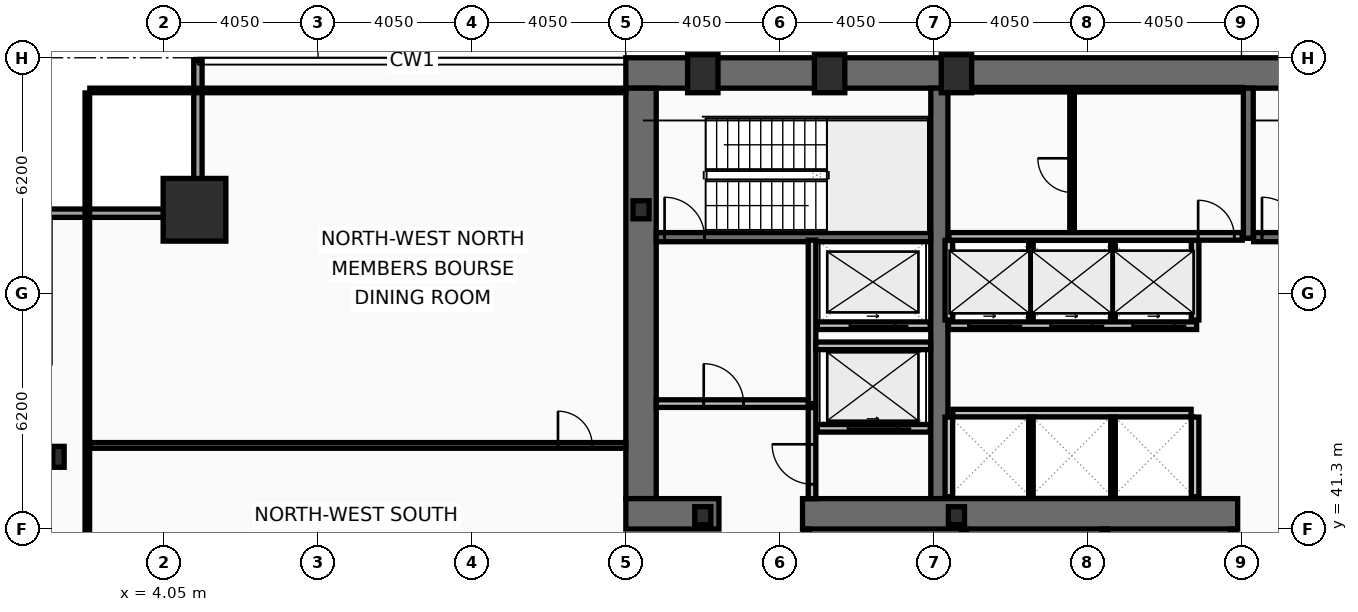
"""IFC4 building model, lengths in metres.
Left out: names, types, materials, properties, quantities, classifications, styles, units other than length and angle.
Written with IfcOpenShell. Run it as: python <this file> out.ifc"""

import sys

from ifc_helpers import new_model, si_unit, direction, frame, frame_2d, origin, origin_2d, place, context, subcontext, project, spatial, rectangle, hollow_rectangle, i_section, extrude, element, fill, save


model = new_model("IFC4")
c1 = context("Model", 3, precision=1e-05, world=origin(), true_north=direction((0.0, 1.0)))
c2 = subcontext(c1, "Body", "Model", "MODEL_VIEW")
j1 = project(units=[si_unit("LENGTHUNIT", "METRE"), si_unit("PLANEANGLEUNIT", "RADIAN")], contexts=[c1])
p1 = place(None, origin())
s1 = spatial("IfcSite", under=j1, at=p1, CompositionType="ELEMENT")
p2 = place(p1, origin())
s2 = spatial("IfcBuilding", under=s1, at=p2, CompositionType="ELEMENT")
p3 = place(p2, frame((0.0, 0.0, 49.8)))
s3 = spatial("IfcBuildingStorey", under=s2, at=p3, CompositionType="ELEMENT", Elevation=49.8)
p4 = place(p3, frame((16.2, 53.3, 0.0), z_axis=(0.0, 0.0, 1.0), x_axis=(1.0, 0.0, 0.0)))
e1 = element("IfcWall", 1, at=p4, inside=s3, PredefinedType="SHEAR", context=c2, shape_type="SweptSolid", body=[
    extrude(rectangle(XDim=40.5, YDim=0.8, at=frame_2d((20.25, 0.0))), origin(), (0.0, 0.0, 1.0), 3.82),
])
p5 = place(p3, frame((16.6, 42.1, 0.0), z_axis=(0.0, 0.0, 1.0), x_axis=(0.0, 1.0, 0.0)))
e2 = element("IfcWall", 2, at=p5, inside=s3, PredefinedType="SHEAR", context=c2, shape_type="SweptSolid", body=[
    extrude(rectangle(XDim=10.8, YDim=0.8, at=frame_2d((5.4, 0.0))), origin(), (0.0, 0.0, 1.0), 3.82),
])
p6 = place(p3, frame((24.45, 42.1, 0.0), z_axis=(0.0, 0.0, 1.0), x_axis=(0.0, 1.0, 0.0)))
e3 = element("IfcWall", 3, at=p6, inside=s3, PredefinedType="SHEAR", context=c2, shape_type="SweptSolid", body=[
    extrude(rectangle(XDim=10.8, YDim=0.45, at=frame_2d((5.4, 0.0))), origin(), (0.0, 0.0, 1.0), 3.82),
])
p7 = place(p3, frame((18.65, 41.7, 0.0), z_axis=(0.0, 0.0, 1.0), x_axis=(-1.0, 0.0, 0.0)))
e4 = element("IfcWall", 4, at=p7, inside=s3, PredefinedType="SHEAR", context=c2, shape_type="SweptSolid", body=[
    extrude(rectangle(XDim=2.45, YDim=0.8, at=frame_2d((1.225, 0.0))), origin(), (0.0, 0.0, 1.0), 3.82),
])
p8 = place(p3, frame((32.3, 41.7, 0.0), z_axis=(0.0, 0.0, 1.0), x_axis=(-1.0, 0.0, 0.0)))
e5 = element("IfcWall", 5, at=p8, inside=s3, PredefinedType="SHEAR", context=c2, shape_type="SweptSolid", body=[
    extrude(rectangle(XDim=11.45, YDim=0.8, at=frame_2d((5.725, 0.0))), origin(), (0.0, 0.0, 1.0), 3.82),
])
p9 = place(p3, frame((32.58, 48.95, 0.0), z_axis=(0.0, 0.0, 1.0), x_axis=(0.0, 1.0, 0.0)))
e6 = element("IfcWall", 6, at=p9, inside=s3, PredefinedType="SHEAR", context=c2, shape_type="SweptSolid", body=[
    extrude(rectangle(XDim=3.95, YDim=0.26, at=frame_2d((1.975, 0.0))), origin(), (0.0, 0.0, 1.0), 3.82),
])
p10 = place(p3, frame((17.0, 48.98, 0.0), z_axis=(0.0, 0.0, 1.0), x_axis=(1.0, 0.0, 0.0)))
e7 = element("IfcWall", 7, at=p10, inside=s3, PredefinedType="SHEAR", context=c2, shape_type="SweptSolid", body=[
    extrude(rectangle(XDim=7.22, YDim=0.24, at=frame_2d((3.61, 0.0))), origin(), (0.0, 0.0, 1.0), 3.82),
])
p11 = place(p10, frame((0.22, 0.0, 0.0)))
e8 = element("IfcOpeningElement", 8, at=p11, cuts=e7, PredefinedType="OPENING", context=c2, shape_type="SweptSolid", body=[
    extrude(rectangle(XDim=1.05, YDim=2.15, at=frame_2d((0.525, 1.075))), frame((0.0, 0.13, 0.0), z_axis=(0.0, -1.0, 0.0), x_axis=(1.0, 0.0, 0.0)), (0.0, 0.0, 1.0), 0.26),
])
p12 = place(p3, frame((32.72, 48.98, 0.0), z_axis=(0.0, 0.0, 1.0), x_axis=(1.0, 0.0, 0.0)))
e9 = element("IfcWall", 9, at=p12, inside=s3, PredefinedType="SHEAR", context=c2, shape_type="SweptSolid", body=[
    extrude(rectangle(XDim=7.56, YDim=0.24, at=frame_2d((3.78, 0.0))), origin(), (0.0, 0.0, 1.0), 3.82),
])
p13 = place(p12, frame((0.22, 0.0, 0.0)))
e10 = element("IfcOpeningElement", 10, at=p13, cuts=e9, PredefinedType="OPENING", context=c2, shape_type="SweptSolid", body=[
    extrude(rectangle(XDim=1.05, YDim=2.15, at=frame_2d((0.525, 1.075))), frame((0.0, 0.13, 0.0), z_axis=(0.0, -1.0, 0.0), x_axis=(1.0, 0.0, 0.0)), (0.0, 0.0, 1.0), 0.26),
])
p14 = place(p3, frame((4.85, 49.7, 0.0), z_axis=(0.0, 0.0, 1.0), x_axis=(1.0, 0.0, 0.0)))
e11 = element("IfcColumn", 11, at=p14, inside=s3, PredefinedType="COLUMN", context=c2, shape_type="SweptSolid", body=[
    extrude(hollow_rectangle(XDim=1.65, YDim=1.65, WallThickness=0.075, at=origin_2d()), origin(), (0.0, 0.0, 1.0), 4.0),
])
for number, where, z_axis, x_axis in (
    (12, (18.225, 53.28, 0.0), (0.0, 0.0, 1.0), (1.0, 0.0, 0.0)),
    (13, (21.562, 53.28, 0.0), (0.0, 0.0, 1.0), (1.0, 0.0, 0.0)),
    (14, (24.9, 53.28, 0.0), (0.0, 0.0, 1.0), (1.0, 0.0, 0.0)),
):
    element("IfcColumn", number, at=place(p3, frame(where, z_axis=z_axis, x_axis=x_axis)), inside=s3, PredefinedType="COLUMN", context=c2, shape_type="SweptSolid", body=[
        extrude(hollow_rectangle(XDim=0.8, YDim=1.0, WallThickness=0.055, at=origin_2d()), origin(), (0.0, 0.0, 1.0), 4.0),
    ])
p15 = place(p3, frame((1.27, 43.2, 0.0), z_axis=(0.0, 0.0, 1.0), x_axis=(1.0, 0.0, 0.0)))
e15 = element("IfcColumn", 15, at=p15, inside=s3, PredefinedType="COLUMN", context=c2, shape_type="SweptSolid", body=[
    extrude(i_section(OverallWidth=0.3, OverallDepth=0.55, WebThickness=0.015, FlangeThickness=0.029, at=origin_2d()), origin(), (0.0, 0.0, 1.0), 4.0),
])
for number, where, z_axis, x_axis in (
    (16, (16.6, 49.7, 0.0), (0.0, 0.0, 1.0), (1.0, 0.0, 0.0)),
    (17, (18.225, 41.65, 0.0), (0.0, 0.0, 1.0), (1.0, 0.0, 0.0)),
    (18, (24.9, 41.65, 0.0), (0.0, 0.0, 1.0), (1.0, 0.0, 0.0)),
):
    element("IfcColumn", number, at=place(p3, frame(where, z_axis=z_axis, x_axis=x_axis)), inside=s3, PredefinedType="COLUMN", context=c2, shape_type="SweptSolid", body=[
        extrude(i_section(OverallWidth=0.424, OverallDepth=0.474, WebThickness=0.048, FlangeThickness=0.077, at=origin_2d()), origin(), (0.0, 0.0, 1.0), 4.0),
    ])
p16 = place(p3, frame((0.83, 49.61, 0.0), z_axis=(0.0, 0.0, 1.0), x_axis=(1.0, 0.0, 0.0)))
e19 = element("IfcWall", 19, at=p16, inside=s3, PredefinedType="SOLIDWALL", context=c2, shape_type="SweptSolid", body=[
    extrude(rectangle(XDim=4.22, YDim=0.22, at=frame_2d((2.11, 0.0))), origin(), (0.0, 0.0, 1.0), 3.16),
])
p17 = place(p3, frame((4.94, 49.72, 0.0), z_axis=(0.0, 0.0, 1.0), x_axis=(0.0, 1.0, 0.0)))
e20 = element("IfcWall", 20, at=p17, inside=s3, PredefinedType="SOLIDWALL", context=c2, shape_type="SweptSolid", body=[
    extrude(rectangle(XDim=3.91, YDim=0.22, at=frame_2d((1.955, 0.0))), origin(), (0.0, 0.0, 1.0), 3.16),
])
p18 = place(p3, frame((24.21, 43.95, 0.0), z_axis=(0.0, 0.0, 1.0), x_axis=(-1.0, 0.0, 0.0)))
e21 = element("IfcWall", 21, at=p18, inside=s3, PredefinedType="PARTITIONING", context=c2, shape_type="SweptSolid", body=[
    extrude(rectangle(XDim=2.97, YDim=0.2, at=frame_2d((1.485, 0.0))), origin(), (0.0, 0.0, 1.0), 3.82),
])
p19 = place(p18, frame((0.86, 0.0, 0.0)))
e22 = element("IfcOpeningElement", 22, at=p19, cuts=e21, PredefinedType="OPENING", context=c2, shape_type="SweptSolid", body=[
    extrude(rectangle(XDim=1.3, YDim=2.18, at=frame_2d((0.65, 1.09))), frame((0.0, 0.11, 0.0), z_axis=(0.0, -1.0, 0.0), x_axis=(1.0, 0.0, 0.0)), (0.0, 0.0, 1.0), 0.22),
])
p20 = place(p3, frame((24.21, 46.65, 0.0), z_axis=(0.0, 0.0, 1.0), x_axis=(-1.0, 0.0, 0.0)))
e23 = element("IfcWall", 23, at=p20, inside=s3, PredefinedType="PARTITIONING", context=c2, shape_type="SweptSolid", body=[
    extrude(rectangle(XDim=2.97, YDim=0.2, at=frame_2d((1.485, 0.0))), origin(), (0.0, 0.0, 1.0), 3.82),
])
p21 = place(p20, frame((0.91, 0.0, 0.0)))
e24 = element("IfcOpeningElement", 24, at=p21, cuts=e23, PredefinedType="OPENING", context=c2, shape_type="SweptSolid", body=[
    extrude(rectangle(XDim=1.2, YDim=2.18, at=frame_2d((0.6, 1.09))), frame((0.0, 0.11, 0.0), z_axis=(0.0, -1.0, 0.0), x_axis=(1.0, 0.0, 0.0)), (0.0, 0.0, 1.0), 0.22),
])
p22 = place(p3, frame((31.22, 46.65, 0.0), z_axis=(0.0, 0.0, 1.0), x_axis=(-1.0, 0.0, 0.0)))
e25 = element("IfcWall", 25, at=p22, inside=s3, PredefinedType="PARTITIONING", context=c2, shape_type="SweptSolid", body=[
    extrude(rectangle(XDim=6.53, YDim=0.2, at=frame_2d((3.265, 0.0))), origin(), (0.0, 0.0, 1.0), 3.82),
])
p23 = place(p22, frame((4.9, 0.0, 0.0)))
e26 = element("IfcOpeningElement", 26, at=p23, cuts=e25, PredefinedType="OPENING", context=c2, shape_type="SweptSolid", body=[
    extrude(rectangle(XDim=1.1, YDim=2.18, at=frame_2d((0.55, 1.09))), frame((0.0, 0.11, 0.0), z_axis=(0.0, -1.0, 0.0), x_axis=(1.0, 0.0, 0.0)), (0.0, 0.0, 1.0), 0.22),
])
p24 = place(p22, frame((2.74, 0.0, 0.0)))
e27 = element("IfcOpeningElement", 27, at=p24, cuts=e25, PredefinedType="OPENING", context=c2, shape_type="SweptSolid", body=[
    extrude(rectangle(XDim=1.1, YDim=2.18, at=frame_2d((0.55, 1.09))), frame((0.0, 0.11, 0.0), z_axis=(0.0, -1.0, 0.0), x_axis=(1.0, 0.0, 0.0)), (0.0, 0.0, 1.0), 0.22),
])
p25 = place(p22, frame((0.58, 0.0, 0.0)))
e28 = element("IfcOpeningElement", 28, at=p25, cuts=e25, PredefinedType="OPENING", context=c2, shape_type="SweptSolid", body=[
    extrude(rectangle(XDim=1.1, YDim=2.18, at=frame_2d((0.55, 1.09))), frame((0.0, 0.11, 0.0), z_axis=(0.0, -1.0, 0.0), x_axis=(1.0, 0.0, 0.0)), (0.0, 0.0, 1.0), 0.22),
])
p26 = place(p3, frame((21.1, 44.6, 0.0), z_axis=(0.0, 0.0, 1.0), x_axis=(0.0, 1.0, 0.0)))
e29 = element("IfcWall", 29, at=p26, inside=s3, PredefinedType="PARTITIONING", context=c2, shape_type="SweptSolid", body=[
    extrude(rectangle(XDim=4.3, YDim=0.2, at=frame_2d((2.15, 0.0))), origin(), (0.0, 0.0, 1.0), 3.82),
])
p27 = place(p3, frame((17.0, 44.6, 0.0), z_axis=(0.0, 0.0, 1.0), x_axis=(1.0, 0.0, 0.0)))
e30 = element("IfcWall", 30, at=p27, inside=s3, PredefinedType="PARTITIONING", context=c2, shape_type="SweptSolid", body=[
    extrude(rectangle(XDim=4.0, YDim=0.2, at=frame_2d((2.0, 0.0))), origin(), (0.0, 0.0, 1.0), 3.82),
])
p28 = place(p27, frame((1.25, 0.0, 0.0)))
e31 = element("IfcOpeningElement", 31, at=p28, cuts=e30, PredefinedType="OPENING", context=c2, shape_type="SweptSolid", body=[
    extrude(rectangle(XDim=1.05, YDim=2.15, at=frame_2d((0.525, 1.075))), frame((0.0, 0.11, 0.0), z_axis=(0.0, -1.0, 0.0), x_axis=(1.0, 0.0, 0.0)), (0.0, 0.0, 1.0), 0.22),
])
p29 = place(p3, frame((21.2, 46.12, 0.0), z_axis=(0.0, 0.0, 1.0), x_axis=(1.0, 0.0, 0.0)))
e32 = element("IfcWall", 32, at=p29, inside=s3, PredefinedType="PARTITIONING", context=c2, shape_type="SweptSolid", body=[
    extrude(rectangle(XDim=3.02, YDim=0.2, at=frame_2d((1.51, 0.0))), origin(), (0.0, 0.0, 1.0), 3.82),
])
p30 = place(p3, frame((21.1, 42.1, 0.0), z_axis=(0.0, 0.0, 1.0), x_axis=(0.0, 1.0, 0.0)))
e33 = element("IfcWall", 33, at=p30, inside=s3, PredefinedType="PARTITIONING", context=c2, shape_type="SweptSolid", body=[
    extrude(rectangle(XDim=2.395, YDim=0.2, at=frame_2d((1.198, 0.0))), origin(), (0.0, 0.0, 1.0), 3.82),
])
p31 = place(p30, frame((0.38, 0.0, 0.0)))
e34 = element("IfcOpeningElement", 34, at=p31, cuts=e33, PredefinedType="OPENING", context=c2, shape_type="SweptSolid", body=[
    extrude(rectangle(XDim=1.05, YDim=2.15, at=frame_2d((0.525, 1.075))), frame((0.0, 0.11, 0.0), z_axis=(0.0, -1.0, 0.0), x_axis=(1.0, 0.0, 0.0)), (0.0, 0.0, 1.0), 0.22),
])
for number, where, z_axis, x_axis in (
    (35, (24.7, 46.8, 0.0), (0.0, 0.0, 1.0), (0.0, 1.0, 0.0)),
    (36, (31.18, 46.8, 0.0), (0.0, 0.0, 1.0), (0.0, 1.0, 0.0)),
):
    element("IfcWall", number, at=place(p3, frame(where, z_axis=z_axis, x_axis=x_axis)), inside=s3, PredefinedType="PARTITIONING", context=c2, shape_type="SweptSolid", body=[
        extrude(rectangle(XDim=2.095, YDim=0.2, at=frame_2d((1.047, 0.0))), origin(), (0.0, 0.0, 1.0), 3.82),
    ])
for number, where, z_axis, x_axis in (
    (37, (26.86, 46.8, 0.0), (0.0, 0.0, 1.0), (0.0, 1.0, 0.0)),
    (38, (29.02, 46.8, 0.0), (0.0, 0.0, 1.0), (0.0, 1.0, 0.0)),
):
    element("IfcWall", number, at=place(p3, frame(where, z_axis=z_axis, x_axis=x_axis)), inside=s3, PredefinedType="PARTITIONING", context=c2, shape_type="SweptSolid", body=[
        extrude(rectangle(XDim=2.095, YDim=0.12, at=frame_2d((1.047, 0.0))), origin(), (0.0, 0.0, 1.0), 3.82),
    ])
p32 = place(p3, frame((24.805, 44.35, 0.0), z_axis=(0.0, 0.0, 1.0), x_axis=(1.0, 0.0, 0.0)))
e39 = element("IfcWall", 39, at=p32, inside=s3, PredefinedType="PARTITIONING", context=c2, shape_type="SweptSolid", body=[
    extrude(rectangle(XDim=6.27, YDim=0.2, at=frame_2d((3.135, 0.0))), origin(), (0.0, 0.0, 1.0), 3.82),
])
for number, where, z_axis, x_axis in (
    (40, (24.7, 42.15, 0.0), (0.0, 0.0, 1.0), (0.0, 1.0, 0.0)),
    (41, (31.18, 42.15, 0.0), (0.0, 0.0, 1.0), (0.0, 1.0, 0.0)),
):
    element("IfcWall", number, at=place(p3, frame(where, z_axis=z_axis, x_axis=x_axis)), inside=s3, PredefinedType="PARTITIONING", context=c2, shape_type="SweptSolid", body=[
        extrude(rectangle(XDim=2.095, YDim=0.2, at=frame_2d((1.048, 0.0))), origin(), (0.0, 0.0, 1.0), 3.82),
    ])
for number, where, z_axis, x_axis in (
    (42, (26.86, 42.15, 0.0), (0.0, 0.0, 1.0), (0.0, 1.0, 0.0)),
    (43, (29.02, 42.15, 0.0), (0.0, 0.0, 1.0), (0.0, 1.0, 0.0)),
):
    element("IfcWall", number, at=place(p3, frame(where, z_axis=z_axis, x_axis=x_axis)), inside=s3, PredefinedType="PARTITIONING", context=c2, shape_type="SweptSolid", body=[
        extrude(rectangle(XDim=2.095, YDim=0.12, at=frame_2d((1.048, 0.0))), origin(), (0.0, 0.0, 1.0), 3.82),
    ])
p33 = place(p3, frame((24.7, 52.86, 0.0), z_axis=(0.0, 0.0, 1.0), x_axis=(1.0, 0.0, 0.0)))
e44 = element("IfcWall", 44, at=p33, inside=s3, PredefinedType="PARTITIONING", context=c2, shape_type="SweptSolid", body=[
    extrude(rectangle(XDim=7.72, YDim=0.12, at=frame_2d((3.86, 0.0))), origin(), (0.0, 0.0, 1.0), 3.82),
])
p34 = place(p3, frame((24.7, 49.0, 0.0), z_axis=(0.0, 0.0, 1.0), x_axis=(1.0, 0.0, 0.0)))
e45 = element("IfcWall", 45, at=p34, inside=s3, PredefinedType="PARTITIONING", context=c2, shape_type="SweptSolid", body=[
    extrude(rectangle(XDim=7.72, YDim=0.2, at=frame_2d((3.86, 0.0))), origin(), (0.0, 0.0, 1.0), 3.82),
])
p35 = place(p34, frame((6.56, 0.0, 0.0)))
e46 = element("IfcOpeningElement", 46, at=p35, cuts=e45, PredefinedType="OPENING", context=c2, shape_type="SweptSolid", body=[
    extrude(rectangle(XDim=0.95, YDim=2.1, at=frame_2d((0.475, 1.05))), frame((0.0, 0.11, 0.0), z_axis=(0.0, -1.0, 0.0), x_axis=(1.0, 0.0, 0.0)), (0.0, 0.0, 1.0), 0.22),
])
p36 = place(p3, frame((27.942, 49.105, 0.0), z_axis=(0.0, 0.0, 1.0), x_axis=(0.0, 1.0, 0.0)))
e47 = element("IfcWall", 47, at=p36, inside=s3, PredefinedType="PARTITIONING", context=c2, shape_type="SweptSolid", body=[
    extrude(rectangle(XDim=3.69, YDim=0.12, at=frame_2d((1.845, 0.0))), origin(), (0.0, 0.0, 1.0), 3.82),
])
p37 = place(p36, frame((1.05, 0.0, 0.0)))
e48 = element("IfcOpeningElement", 48, at=p37, cuts=e47, PredefinedType="OPENING", context=c2, shape_type="SweptSolid", body=[
    extrude(rectangle(XDim=0.9, YDim=2.05, at=frame_2d((0.45, 1.025))), frame((0.0, 0.07, 0.0), z_axis=(0.0, -1.0, 0.0), x_axis=(1.0, 0.0, 0.0)), (0.0, 0.0, 1.0), 0.14),
])
p38 = place(p3, frame((20.95, 38.28, 0.0), z_axis=(0.0, 0.0, 1.0), x_axis=(0.0, 1.0, 0.0)))
e49 = element("IfcWall", 49, at=p38, inside=s3, PredefinedType="PARTITIONING", context=c2, shape_type="SweptSolid", body=[
    extrude(rectangle(XDim=3.02, YDim=0.15, at=frame_2d((1.51, 0.0))), origin(), (0.0, 0.0, 1.0), 3.82),
])
p39 = place(p3, frame((25.1, 38.28, 0.0), z_axis=(0.0, 0.0, 1.0), x_axis=(0.0, 1.0, 0.0)))
e50 = element("IfcWall", 50, at=p39, inside=s3, PredefinedType="PARTITIONING", context=c2, shape_type="SweptSolid", body=[
    extrude(rectangle(XDim=3.02, YDim=0.15, at=frame_2d((1.51, 0.0))), origin(), (0.0, 0.0, 1.0), 3.01),
])
for number, where, z_axis, x_axis in (
    (51, (28.8, 38.28, 0.0), (0.0, 0.0, 1.0), (0.0, 1.0, 0.0)),
    (52, (32.18, 38.28, 0.0), (0.0, 0.0, 1.0), (0.0, 1.0, 0.0)),
):
    element("IfcWall", number, at=place(p3, frame(where, z_axis=z_axis, x_axis=x_axis)), inside=s3, PredefinedType="PARTITIONING", context=c2, shape_type="SweptSolid", body=[
        extrude(rectangle(XDim=3.02, YDim=0.15, at=frame_2d((1.51, 0.0))), origin(), (0.0, 0.0, 1.0), 3.82),
    ])
p40 = place(p3, frame((2.095, 43.5, 0.0), z_axis=(0.0, 0.0, 1.0), x_axis=(1.0, 0.0, 0.0)))
e53 = element("IfcWall", 53, at=p40, inside=s3, PredefinedType="PARTITIONING", context=c2, shape_type="SweptSolid", body=[
    extrude(rectangle(XDim=14.105, YDim=0.15, at=frame_2d((7.052, 0.0))), origin(), (0.0, 0.0, 1.0), 3.01),
])
p41 = place(p40, frame((12.32, 0.0, 0.0)))
e54 = element("IfcOpeningElement", 54, at=p41, cuts=e53, PredefinedType="OPENING", context=c2, shape_type="SweptSolid", body=[
    extrude(rectangle(XDim=0.9, YDim=2.05, at=frame_2d((0.45, 1.025))), frame((0.0, 0.085, 0.0), z_axis=(0.0, -1.0, 0.0), x_axis=(1.0, 0.0, 0.0)), (0.0, 0.0, 1.0), 0.17),
])
p42 = place(p3, frame((2.03, 10.665, 0.0), z_axis=(0.0, 0.0, 1.0), x_axis=(0.0, 1.0, 0.0)))
e55 = element("IfcWall", 55, at=p42, inside=s3, PredefinedType="PARTITIONING", context=c2, shape_type="SweptSolid", body=[
    extrude(rectangle(XDim=42.11, YDim=0.12, at=frame_2d((21.055, 0.0))), origin(), (0.0, 0.0, 1.0), 3.01),
])
p43 = place(p3, frame((2.095, 52.84, 0.0), z_axis=(0.0, 0.0, 1.0), x_axis=(1.0, 0.0, 0.0)))
e56 = element("IfcWall", 56, at=p43, inside=s3, PredefinedType="PARTITIONING", context=c2, shape_type="SweptSolid", body=[
    extrude(rectangle(XDim=14.105, YDim=0.12, at=frame_2d((7.052, 0.0))), origin(), (0.0, 0.0, 1.0), 3.82),
])
p44 = place(p11, origin())
e57 = element("IfcDoor", 57, at=p44, inside=s3, OperationType="SINGLE_SWING_LEFT", PredefinedType="DOOR", context=c2, shape_type="SweptSolid", body=[
    extrude(rectangle(XDim=1.05, YDim=2.15, at=frame_2d((0.525, 1.075))), frame((0.0, 0.025, 0.0), z_axis=(0.0, -1.0, 0.0), x_axis=(1.0, 0.0, 0.0)), (0.0, 0.0, 1.0), 0.05),
])
fill(e8, e57)
p45 = place(p13, origin())
e58 = element("IfcDoor", 58, at=p45, inside=s3, OperationType="SINGLE_SWING_LEFT", PredefinedType="DOOR", context=c2, shape_type="SweptSolid", body=[
    extrude(rectangle(XDim=1.05, YDim=2.15, at=frame_2d((0.525, 1.075))), frame((0.0, 0.025, 0.0), z_axis=(0.0, -1.0, 0.0), x_axis=(1.0, 0.0, 0.0)), (0.0, 0.0, 1.0), 0.05),
])
fill(e10, e58)
p46 = place(p19, origin())
e59 = element("IfcDoor", 59, at=p46, inside=s3, OperationType="SLIDING_TO_LEFT", PredefinedType="DOOR", context=c2, shape_type="SweptSolid", body=[
    extrude(rectangle(XDim=1.3, YDim=2.18, at=frame_2d((0.65, 1.09))), frame((0.0, 0.025, 0.0), z_axis=(0.0, -1.0, 0.0), x_axis=(1.0, 0.0, 0.0)), (0.0, 0.0, 1.0), 0.05),
])
fill(e22, e59)
p47 = place(p21, origin())
e60 = element("IfcDoor", 60, at=p47, inside=s3, OperationType="SLIDING_TO_LEFT", PredefinedType="DOOR", context=c2, shape_type="SweptSolid", body=[
    extrude(rectangle(XDim=1.2, YDim=2.18, at=frame_2d((0.6, 1.09))), frame((0.0, 0.025, 0.0), z_axis=(0.0, -1.0, 0.0), x_axis=(1.0, 0.0, 0.0)), (0.0, 0.0, 1.0), 0.05),
])
fill(e24, e60)
p48 = place(p23, origin())
e61 = element("IfcDoor", 61, at=p48, inside=s3, OperationType="SLIDING_TO_LEFT", PredefinedType="DOOR", context=c2, shape_type="SweptSolid", body=[
    extrude(rectangle(XDim=1.1, YDim=2.18, at=frame_2d((0.55, 1.09))), frame((0.0, 0.025, 0.0), z_axis=(0.0, -1.0, 0.0), x_axis=(1.0, 0.0, 0.0)), (0.0, 0.0, 1.0), 0.05),
])
fill(e26, e61)
p49 = place(p24, origin())
e62 = element("IfcDoor", 62, at=p49, inside=s3, OperationType="SLIDING_TO_LEFT", PredefinedType="DOOR", context=c2, shape_type="SweptSolid", body=[
    extrude(rectangle(XDim=1.1, YDim=2.18, at=frame_2d((0.55, 1.09))), frame((0.0, 0.025, 0.0), z_axis=(0.0, -1.0, 0.0), x_axis=(1.0, 0.0, 0.0)), (0.0, 0.0, 1.0), 0.05),
])
fill(e27, e62)
p50 = place(p25, origin())
e63 = element("IfcDoor", 63, at=p50, inside=s3, OperationType="SLIDING_TO_LEFT", PredefinedType="DOOR", context=c2, shape_type="SweptSolid", body=[
    extrude(rectangle(XDim=1.1, YDim=2.18, at=frame_2d((0.55, 1.09))), frame((0.0, 0.025, 0.0), z_axis=(0.0, -1.0, 0.0), x_axis=(1.0, 0.0, 0.0)), (0.0, 0.0, 1.0), 0.05),
])
fill(e28, e63)
p51 = place(p28, origin())
e64 = element("IfcDoor", 64, at=p51, inside=s3, OperationType="SINGLE_SWING_LEFT", PredefinedType="DOOR", context=c2, shape_type="SweptSolid", body=[
    extrude(rectangle(XDim=1.05, YDim=2.15, at=frame_2d((0.525, 1.075))), frame((0.0, 0.025, 0.0), z_axis=(0.0, -1.0, 0.0), x_axis=(1.0, 0.0, 0.0)), (0.0, 0.0, 1.0), 0.05),
])
fill(e31, e64)
p52 = place(p31, origin())
e65 = element("IfcDoor", 65, at=p52, inside=s3, OperationType="SINGLE_SWING_RIGHT", PredefinedType="DOOR", context=c2, shape_type="SweptSolid", body=[
    extrude(rectangle(XDim=1.05, YDim=2.15, at=frame_2d((0.525, 1.075))), frame((0.0, 0.025, 0.0), z_axis=(0.0, -1.0, 0.0), x_axis=(1.0, 0.0, 0.0)), (0.0, 0.0, 1.0), 0.05),
])
fill(e34, e65)
p53 = place(p35, origin())
e66 = element("IfcDoor", 66, at=p53, inside=s3, OperationType="SINGLE_SWING_LEFT", PredefinedType="DOOR", context=c2, shape_type="SweptSolid", body=[
    extrude(rectangle(XDim=0.95, YDim=2.1, at=frame_2d((0.475, 1.05))), frame((0.0, 0.025, 0.0), z_axis=(0.0, -1.0, 0.0), x_axis=(1.0, 0.0, 0.0)), (0.0, 0.0, 1.0), 0.05),
])
fill(e46, e66)
p54 = place(p37, origin())
e67 = element("IfcDoor", 67, at=p54, inside=s3, OperationType="SINGLE_SWING_RIGHT", PredefinedType="DOOR", context=c2, shape_type="SweptSolid", body=[
    extrude(rectangle(XDim=0.9, YDim=2.05, at=frame_2d((0.45, 1.025))), frame((0.0, 0.025, 0.0), z_axis=(0.0, -1.0, 0.0), x_axis=(1.0, 0.0, 0.0)), (0.0, 0.0, 1.0), 0.05),
])
fill(e48, e67)
p55 = place(p41, origin())
e68 = element("IfcDoor", 68, at=p55, inside=s3, OperationType="SINGLE_SWING_LEFT", PredefinedType="DOOR", context=c2, shape_type="SweptSolid", body=[
    extrude(rectangle(XDim=0.9, YDim=2.05, at=frame_2d((0.45, 1.025))), frame((0.0, 0.025, 0.0), z_axis=(0.0, -1.0, 0.0), x_axis=(1.0, 0.0, 0.0)), (0.0, 0.0, 1.0), 0.05),
])
fill(e54, e68)
save(model, sys.argv[1])
